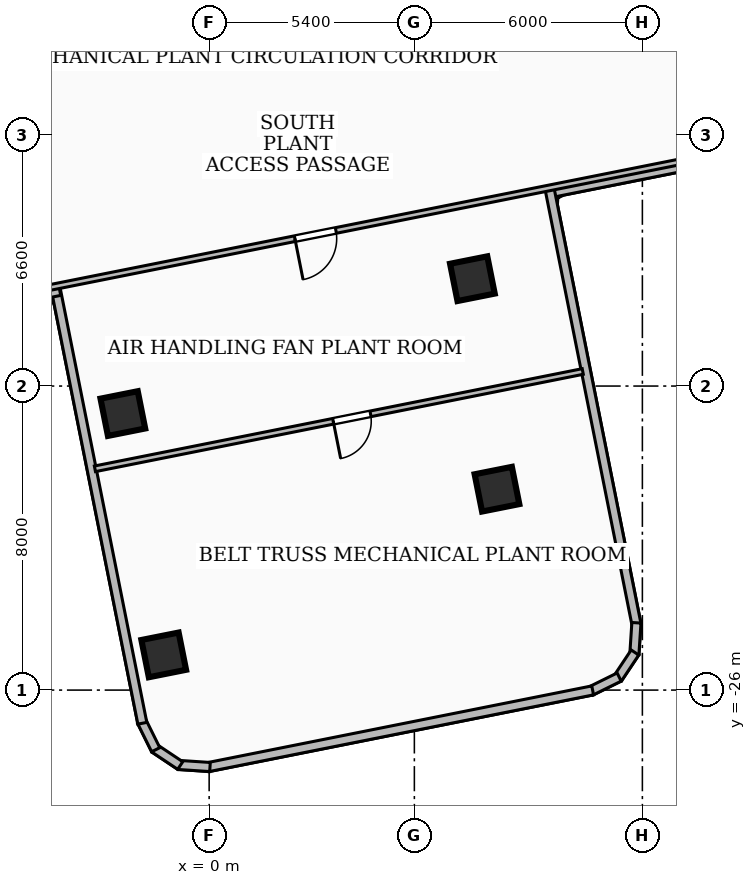
"""IFC4 building model, lengths in metres.
Left out: names, types, materials, properties, quantities, classifications, styles, units other than length and angle.
Written with IfcOpenShell. Run it as: python <this file> out.ifc"""

import sys

from ifc_helpers import new_model, si_unit, direction, frame, frame_2d, origin, origin_2d, place, context, subcontext, project, spatial, rectangle, extrude, element, fill, save


model = new_model("IFC4")
c1 = context("Model", 3, precision=1e-05, world=origin(), true_north=direction((0.0, 1.0)))
c2 = subcontext(c1, "Body", "Model", "MODEL_VIEW")
j1 = project(units=[si_unit("LENGTHUNIT", "METRE"), si_unit("PLANEANGLEUNIT", "RADIAN")], contexts=[c1])
p1 = place(None, origin())
s1 = spatial("IfcSite", under=j1, at=p1, CompositionType="ELEMENT")
p2 = place(p1, origin())
s2 = spatial("IfcBuilding", under=s1, at=p2, CompositionType="ELEMENT")
p3 = place(p2, frame((0.0, 0.0, 107.28)))
s3 = spatial("IfcBuildingStorey", under=s2, at=p3, CompositionType="ELEMENT", Elevation=107.28)
for number, where, z_axis, x_axis in (
    (1, (-2.271, -18.724, 0.0), (0.0, 0.0, 1.0), (0.981, 0.196, 0.0)),
    (2, (6.927, -15.175, 0.0), (0.0, 0.0, 1.0), (0.981, 0.196, 0.0)),
    (3, (-1.195, -25.074, 0.0), (0.0, 0.0, 1.0), (0.981, 0.196, 0.0)),
    (4, (7.574, -20.714, 0.0), (0.0, 0.0, 1.0), (0.981, 0.196, 0.0)),
):
    element("IfcColumn", number, at=place(p3, frame(where, z_axis=z_axis, x_axis=x_axis)), inside=s3, PredefinedType="COLUMN", context=c2, shape_type="SweptSolid", body=[
        extrude(rectangle(XDim=1.0, YDim=1.0, at=origin_2d()), origin(), (0.0, 0.0, 1.0), 4.68),
    ])
p4 = place(p3, frame((15.532, -11.616, 0.0), z_axis=(0.0, 0.0, 1.0), x_axis=(-0.980667882289, -0.195679596911, 0.0)))
e5 = element("IfcWall", 5, at=p4, inside=s3, PredefinedType="SOLIDWALL", context=c2, shape_type="SweptSolid", body=[
    extrude(rectangle(XDim=6.776, YDim=0.24, at=frame_2d((3.388, 0.0))), origin(), (0.0, 0.0, 1.0), 2.212),
])
p5 = place(p3, frame((8.962, -12.829, 0.0), z_axis=(0.0, 0.0, 1.0), x_axis=(0.19563758561, -0.980676264165, 0.0)))
e6 = element("IfcWall", 6, at=p5, inside=s3, PredefinedType="SOLIDWALL", context=c2, shape_type="SweptSolid", body=[
    extrude(rectangle(XDim=11.676, YDim=0.24, at=frame_2d((5.838, 0.0))), origin(), (0.0, 0.0, 1.0), 2.212),
])
p6 = place(p3, frame((11.243, -24.229, 0.0), z_axis=(0.0, 0.0, 1.0), x_axis=(-0.06503454612, -0.997883013089, 0.0)))
e7 = element("IfcWall", 7, at=p6, inside=s3, PredefinedType="SOLIDWALL", context=c2, shape_type="SweptSolid", body=[
    extrude(rectangle(XDim=0.83, YDim=0.24, at=frame_2d((0.415, 0.0))), origin(), (0.0, 0.0, 1.0), 4.42),
])
p7 = place(p3, frame((11.205, -25.011, 0.0), z_axis=(0.0, 0.0, 1.0), x_axis=(-0.55483846032, -0.831958101679, 0.0)))
e8 = element("IfcWall", 8, at=p7, inside=s3, PredefinedType="SOLIDWALL", context=c2, shape_type="SweptSolid", body=[
    extrude(rectangle(XDim=0.815, YDim=0.24, at=frame_2d((0.407, 0.0))), origin(), (0.0, 0.0, 1.0), 4.42),
])
p8 = place(p3, frame((10.789, -25.657, 0.0), z_axis=(0.0, 0.0, 1.0), x_axis=(-0.896885260774, -0.442263302803, 0.0)))
e9 = element("IfcWall", 9, at=p8, inside=s3, PredefinedType="SOLIDWALL", context=c2, shape_type="SweptSolid", body=[
    extrude(rectangle(XDim=0.83, YDim=0.24, at=frame_2d((0.415, 0.0))), origin(), (0.0, 0.0, 1.0), 4.42),
])
p9 = place(p3, frame((10.092, -26.008, 0.0), z_axis=(0.0, 0.0, 1.0), x_axis=(-0.980673378221, -0.195652051479, 0.0)))
e10 = element("IfcWall", 10, at=p9, inside=s3, PredefinedType="SOLIDWALL", context=c2, shape_type="SweptSolid", body=[
    extrude(rectangle(XDim=10.32, YDim=0.24, at=frame_2d((5.16, 0.0))), origin(), (0.0, 0.0, 1.0), 4.42),
])
p10 = place(p3, frame((0.022, -28.024, 0.0), z_axis=(0.0, 0.0, 1.0), x_axis=(-0.997811090969, 0.066128864644, 0.0)))
e11 = element("IfcWall", 11, at=p10, inside=s3, PredefinedType="SOLIDWALL", context=c2, shape_type="SweptSolid", body=[
    extrude(rectangle(XDim=0.831, YDim=0.24, at=frame_2d((0.415, 0.0))), origin(), (0.0, 0.0, 1.0), 4.42),
])
p11 = place(p3, frame((-0.761, -27.985, 0.0), z_axis=(0.0, 0.0, 1.0), x_axis=(-0.831588640817, 0.555392052936, 0.0)))
e12 = element("IfcWall", 12, at=p11, inside=s3, PredefinedType="SOLIDWALL", context=c2, shape_type="SweptSolid", body=[
    extrude(rectangle(XDim=0.814, YDim=0.24, at=frame_2d((0.407, 0.0))), origin(), (0.0, 0.0, 1.0), 4.42),
])
p12 = place(p3, frame((-1.406, -27.569, 0.0), z_axis=(0.0, 0.0, 1.0), x_axis=(-0.443677176371, 0.896186678749, 0.0)))
e13 = element("IfcWall", 13, at=p12, inside=s3, PredefinedType="SOLIDWALL", context=c2, shape_type="SweptSolid", body=[
    extrude(rectangle(XDim=0.829, YDim=0.24, at=frame_2d((0.415, 0.0))), origin(), (0.0, 0.0, 1.0), 4.42),
])
p13 = place(p3, frame((-1.758, -26.873, 0.0), z_axis=(0.0, 0.0, 1.0), x_axis=(-0.195601431005, 0.980683476046, 0.0)))
e14 = element("IfcWall", 14, at=p13, inside=s3, PredefinedType="SOLIDWALL", context=c2, shape_type="SweptSolid", body=[
    extrude(rectangle(XDim=11.677, YDim=0.24, at=frame_2d((5.838, 0.0))), origin(), (0.0, 0.0, 1.0), 2.212),
])
p14 = place(p3, frame((-3.929, -15.497, 0.0), z_axis=(0.0, 0.0, 1.0), x_axis=(-0.98066404714, -0.19569881616, 0.0)))
e15 = element("IfcWall", 15, at=p14, inside=s3, PredefinedType="SOLIDWALL", context=c2, shape_type="SweptSolid", body=[
    extrude(rectangle(XDim=6.075, YDim=0.24, at=frame_2d((3.038, 0.0))), origin(), (0.0, 0.0, 1.0), 2.212),
])
p15 = place(p3, frame((13.24, -11.931, 0.0), z_axis=(0.0, 0.0, 1.0), x_axis=(-0.980688099455, -0.19557824927, 0.0)))
e16 = element("IfcWall", 16, at=p15, inside=s3, PredefinedType="PARTITIONING", context=c2, shape_type="SweptSolid", body=[
    extrude(rectangle(XDim=20.601, YDim=0.15, at=frame_2d((10.3, 0.0))), origin(), (0.0, 0.0, 1.0), 2.212),
])
p16 = place(p15, frame((10.1, 0.0, 0.0)))
e17 = element("IfcOpeningElement", 17, at=p16, cuts=e16, PredefinedType="OPENING", context=c2, shape_type="SweptSolid", body=[
    extrude(rectangle(XDim=1.1, YDim=2.15, at=frame_2d((0.55, 1.075))), frame((0.0, 0.085, 0.0), z_axis=(0.0, -1.0, 0.0), x_axis=(1.0, 0.0, 0.0)), (0.0, 0.0, 1.0), 0.17),
])
p17 = place(p3, frame((9.831, -17.617, 0.0), z_axis=(0.0, 0.0, 1.0), x_axis=(-0.980674534157, -0.195646257456, 0.0)))
e18 = element("IfcWall", 18, at=p17, inside=s3, PredefinedType="PARTITIONING", context=c2, shape_type="SweptSolid", body=[
    extrude(rectangle(XDim=13.09, YDim=0.15, at=frame_2d((6.545, 0.0))), origin(), (0.0, 0.0, 1.0), 2.212),
])
p18 = place(p17, frame((5.695, 0.0, 0.0)))
e19 = element("IfcOpeningElement", 19, at=p18, cuts=e18, PredefinedType="OPENING", context=c2, shape_type="SweptSolid", body=[
    extrude(rectangle(XDim=1.0, YDim=2.1, at=frame_2d((0.5, 1.05))), frame((0.0, 0.085, 0.0), z_axis=(0.0, -1.0, 0.0), x_axis=(1.0, 0.0, 0.0)), (0.0, 0.0, 1.0), 0.17),
])
p19 = place(p16, origin())
e20 = element("IfcDoor", 20, at=p19, inside=s3, OperationType="SINGLE_SWING_RIGHT", PredefinedType="DOOR", context=c2, shape_type="SweptSolid", body=[
    extrude(rectangle(XDim=1.1, YDim=2.15, at=frame_2d((0.55, 1.075))), frame((0.0, 0.025, 0.0), z_axis=(0.0, -1.0, 0.0), x_axis=(1.0, 0.0, 0.0)), (0.0, 0.0, 1.0), 0.05),
])
fill(e17, e20)
p20 = place(p18, origin())
e21 = element("IfcDoor", 21, at=p20, inside=s3, OperationType="SINGLE_SWING_RIGHT", PredefinedType="DOOR", context=c2, shape_type="SweptSolid", body=[
    extrude(rectangle(XDim=1.0, YDim=2.1, at=frame_2d((0.5, 1.05))), frame((0.0, 0.025, 0.0), z_axis=(0.0, -1.0, 0.0), x_axis=(1.0, 0.0, 0.0)), (0.0, 0.0, 1.0), 0.05),
])
fill(e19, e21)
save(model, sys.argv[1])
